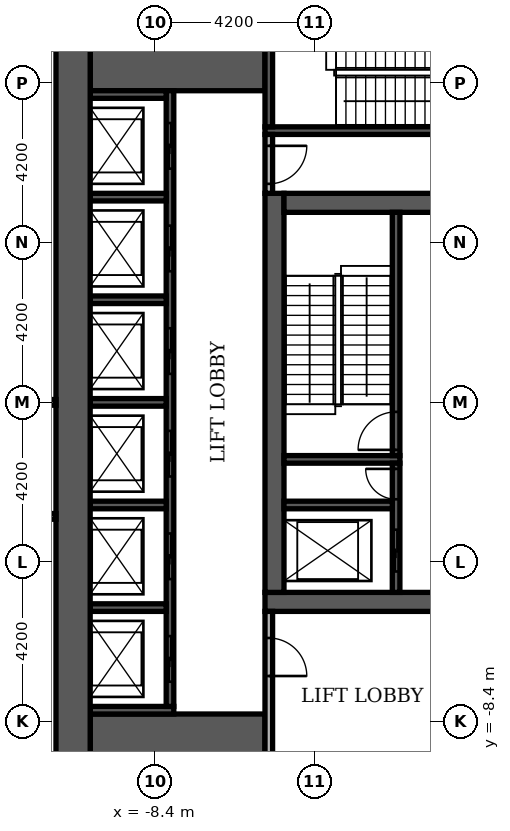
"""IFC4 building model, lengths in metres.
Left out: names, types, materials, properties, quantities, classifications, styles, units other than length and angle.
Written with IfcOpenShell. Run it as: python <this file> out.ifc"""

import sys

from ifc_helpers import new_model, si_unit, direction, frame, frame_2d, origin, place, context, subcontext, project, spatial, rectangle, extrude, element, fill, save


model = new_model("IFC4")
c1 = context("Model", 3, precision=1e-05, world=origin(), true_north=direction((0.0, 1.0)))
c2 = subcontext(c1, "Body", "Model", "MODEL_VIEW")
j1 = project(units=[si_unit("LENGTHUNIT", "METRE"), si_unit("PLANEANGLEUNIT", "RADIAN")], contexts=[c1])
p1 = place(None, origin())
s1 = spatial("IfcSite", under=j1, at=p1, CompositionType="ELEMENT")
p2 = place(p1, origin())
s2 = spatial("IfcBuilding", under=s1, at=p2, CompositionType="ELEMENT")
p3 = place(p2, frame((0.0, 0.0, 7.2)))
s3 = spatial("IfcBuildingStorey", under=s2, at=p3, CompositionType="ELEMENT", Elevation=7.2)
p4 = place(p3, frame((-5.5, -5.25, 0.0), z_axis=(0.0, 0.0, 1.0), x_axis=(1.0, 0.0, 0.0)))
e1 = element("IfcWall", 1, at=p4, inside=s3, PredefinedType="SHEAR", context=c2, shape_type="SweptSolid", body=[
    extrude(rectangle(XDim=11.0, YDim=0.5, at=frame_2d((5.5, 0.0))), origin(), (0.0, 0.0, 1.0), 4.38),
])
p5 = place(p4, frame((4.9, 0.0, 0.0)))
e2 = element("IfcOpeningElement", 2, at=p5, cuts=e1, PredefinedType="OPENING", context=c2, shape_type="SweptSolid", body=[
    extrude(rectangle(XDim=1.2, YDim=2.1, at=frame_2d((0.6, 1.05))), frame((0.0, 0.26, 0.0), z_axis=(0.0, -1.0, 0.0), x_axis=(1.0, 0.0, 0.0)), (0.0, 0.0, 1.0), 0.52),
])
p6 = place(p3, frame((-5.25, -5.0, 0.0), z_axis=(0.0, 0.0, 1.0), x_axis=(0.0, 1.0, 0.0)))
e3 = element("IfcWall", 3, at=p6, inside=s3, PredefinedType="SHEAR", context=c2, shape_type="SweptSolid", body=[
    extrude(rectangle(XDim=10.5, YDim=0.5, at=frame_2d((5.25, 0.0))), origin(), (0.0, 0.0, 1.0), 4.38),
])
p7 = place(p3, frame((-5.0, 5.25, 0.0), z_axis=(0.0, 0.0, 1.0), x_axis=(1.0, 0.0, 0.0)))
e4 = element("IfcWall", 4, at=p7, inside=s3, PredefinedType="SHEAR", context=c2, shape_type="SweptSolid", body=[
    extrude(rectangle(XDim=10.0, YDim=0.5, at=frame_2d((5.0, 0.0))), origin(), (0.0, 0.0, 1.0), 4.38),
])
p8 = place(p7, frame((4.4, 0.0, 0.0)))
e5 = element("IfcOpeningElement", 5, at=p8, cuts=e4, PredefinedType="OPENING", context=c2, shape_type="SweptSolid", body=[
    extrude(rectangle(XDim=1.2, YDim=2.1, at=frame_2d((0.6, 1.05))), frame((0.0, 0.26, 0.0), z_axis=(0.0, -1.0, 0.0), x_axis=(1.0, 0.0, 0.0)), (0.0, 0.0, 1.0), 0.52),
])
for number, where, z_axis, x_axis in (
    (6, (-10.1, -9.15, 0.0), (0.0, 0.0, 1.0), (1.0, 0.0, 0.0)),
    (7, (-10.1, 9.15, 0.0), (0.0, 0.0, 1.0), (1.0, 0.0, 0.0)),
):
    element("IfcWall", number, at=place(p3, frame(where, z_axis=z_axis, x_axis=x_axis)), inside=s3, PredefinedType="SHEAR", context=c2, shape_type="SweptSolid", body=[
        extrude(rectangle(XDim=4.6, YDim=1.9, at=frame_2d((2.3, 0.0))), origin(), (0.0, 0.0, 1.0), 4.38),
    ])
p9 = place(p3, frame((-5.0, -1.5, 0.0), z_axis=(0.0, 0.0, 1.0), x_axis=(1.0, 0.0, 0.0)))
e8 = element("IfcWall", 8, at=p9, inside=s3, PredefinedType="SHEAR", context=c2, shape_type="SweptSolid", body=[
    extrude(rectangle(XDim=3.05, YDim=0.2, at=frame_2d((1.525, 0.0))), origin(), (0.0, 0.0, 1.0), 4.38),
])
p10 = place(p3, frame((-2.05, -1.4, 0.0), z_axis=(0.0, 0.0, 1.0), x_axis=(0.0, 1.0, 0.0)))
e9 = element("IfcWall", 9, at=p10, inside=s3, PredefinedType="SHEAR", context=c2, shape_type="SweptSolid", body=[
    extrude(rectangle(XDim=6.4, YDim=0.2, at=frame_2d((3.2, 0.0))), origin(), (0.0, 0.0, 1.0), 4.38),
])
p11 = place(p10, frame((0.15, 0.0, 0.0)))
e10 = element("IfcOpeningElement", 10, at=p11, cuts=e9, PredefinedType="OPENING", context=c2, shape_type="SweptSolid", body=[
    extrude(rectangle(XDim=1.0, YDim=2.1, at=frame_2d((0.5, 1.05))), frame((0.0, 0.11, 0.0), z_axis=(0.0, -1.0, 0.0), x_axis=(1.0, 0.0, 0.0)), (0.0, 0.0, 1.0), 0.22),
])
p12 = place(p3, frame((-5.5, 7.15, 0.0), z_axis=(0.0, 0.0, 1.0), x_axis=(1.0, 0.0, 0.0)))
e11 = element("IfcWall", 11, at=p12, inside=s3, PredefinedType="SHEAR", context=c2, shape_type="SweptSolid", body=[
    extrude(rectangle(XDim=6.8, YDim=0.2, at=frame_2d((3.4, 0.0))), origin(), (0.0, 0.0, 1.0), 4.38),
])
p13 = place(p3, frame((-5.4, 7.25, 0.0), z_axis=(0.0, 0.0, 1.0), x_axis=(0.0, 1.0, 0.0)))
e12 = element("IfcWall", 12, at=p13, inside=s3, PredefinedType="SHEAR", context=c2, shape_type="SweptSolid", body=[
    extrude(rectangle(XDim=2.85, YDim=0.2, at=frame_2d((1.425, 0.0))), origin(), (0.0, 0.0, 1.0), 4.38),
])
p14 = place(p3, frame((-10.1, -8.1, 0.0), z_axis=(0.0, 0.0, 1.0), x_axis=(1.0, 0.0, 0.0)))
e13 = element("IfcWall", 13, at=p14, inside=s3, PredefinedType="SHEAR", context=c2, shape_type="SweptSolid", body=[
    extrude(rectangle(XDim=2.2, YDim=0.2, at=frame_2d((1.1, 0.0))), origin(), (0.0, 0.0, 1.0), 4.38),
])
p15 = place(p3, frame((-8.0, -8.0, 0.0), z_axis=(0.0, 0.0, 1.0), x_axis=(0.0, 1.0, 0.0)))
e14 = element("IfcWall", 14, at=p15, inside=s3, PredefinedType="SHEAR", context=c2, shape_type="SweptSolid", body=[
    extrude(rectangle(XDim=16.2, YDim=0.2, at=frame_2d((8.1, 0.0))), origin(), (0.0, 0.0, 1.0), 4.38),
])
p16 = place(p15, frame((0.65, 0.0, 0.0)))
e15 = element("IfcOpeningElement", 15, at=p16, cuts=e14, PredefinedType="OPENING", context=c2, shape_type="SweptSolid", body=[
    extrude(rectangle(XDim=1.2, YDim=2.1, at=frame_2d((0.6, 1.05))), frame((0.0, 0.11, 0.0), z_axis=(0.0, -1.0, 0.0), x_axis=(1.0, 0.0, 0.0)), (0.0, 0.0, 1.0), 0.22),
])
p17 = place(p15, frame((3.35, 0.0, 0.0)))
e16 = element("IfcOpeningElement", 16, at=p17, cuts=e14, PredefinedType="OPENING", context=c2, shape_type="SweptSolid", body=[
    extrude(rectangle(XDim=1.2, YDim=2.1, at=frame_2d((0.6, 1.05))), frame((0.0, 0.11, 0.0), z_axis=(0.0, -1.0, 0.0), x_axis=(1.0, 0.0, 0.0)), (0.0, 0.0, 1.0), 0.22),
])
p18 = place(p15, frame((6.05, 0.0, 0.0)))
e17 = element("IfcOpeningElement", 17, at=p18, cuts=e14, PredefinedType="OPENING", context=c2, shape_type="SweptSolid", body=[
    extrude(rectangle(XDim=1.2, YDim=2.1, at=frame_2d((0.6, 1.05))), frame((0.0, 0.11, 0.0), z_axis=(0.0, -1.0, 0.0), x_axis=(1.0, 0.0, 0.0)), (0.0, 0.0, 1.0), 0.22),
])
p19 = place(p15, frame((8.75, 0.0, 0.0)))
e18 = element("IfcOpeningElement", 18, at=p19, cuts=e14, PredefinedType="OPENING", context=c2, shape_type="SweptSolid", body=[
    extrude(rectangle(XDim=1.2, YDim=2.1, at=frame_2d((0.6, 1.05))), frame((0.0, 0.11, 0.0), z_axis=(0.0, -1.0, 0.0), x_axis=(1.0, 0.0, 0.0)), (0.0, 0.0, 1.0), 0.22),
])
p20 = place(p15, frame((11.45, 0.0, 0.0)))
e19 = element("IfcOpeningElement", 19, at=p20, cuts=e14, PredefinedType="OPENING", context=c2, shape_type="SweptSolid", body=[
    extrude(rectangle(XDim=1.2, YDim=2.1, at=frame_2d((0.6, 1.05))), frame((0.0, 0.11, 0.0), z_axis=(0.0, -1.0, 0.0), x_axis=(1.0, 0.0, 0.0)), (0.0, 0.0, 1.0), 0.22),
])
p21 = place(p15, frame((14.15, 0.0, 0.0)))
e20 = element("IfcOpeningElement", 20, at=p21, cuts=e14, PredefinedType="OPENING", context=c2, shape_type="SweptSolid", body=[
    extrude(rectangle(XDim=1.2, YDim=2.1, at=frame_2d((0.6, 1.05))), frame((0.0, 0.11, 0.0), z_axis=(0.0, -1.0, 0.0), x_axis=(1.0, 0.0, 0.0)), (0.0, 0.0, 1.0), 0.22),
])
p22 = place(p3, frame((-10.1, -5.4, 0.0), z_axis=(0.0, 0.0, 1.0), x_axis=(1.0, 0.0, 0.0)))
e21 = element("IfcWall", 21, at=p22, inside=s3, PredefinedType="SHEAR", context=c2, shape_type="SweptSolid", body=[
    extrude(rectangle(XDim=2.0, YDim=0.2, at=frame_2d((1.0, 0.0))), origin(), (0.0, 0.0, 1.0), 4.38),
])
p23 = place(p3, frame((-2.05, -5.0, 0.0), z_axis=(0.0, 0.0, 1.0), x_axis=(0.0, 1.0, 0.0)))
e22 = element("IfcWall", 22, at=p23, inside=s3, PredefinedType="SHEAR", context=c2, shape_type="SweptSolid", body=[
    extrude(rectangle(XDim=3.4, YDim=0.2, at=frame_2d((1.7, 0.0))), origin(), (0.0, 0.0, 1.0), 4.38),
])
p24 = place(p23, frame((0.55, 0.0, 0.0)))
e23 = element("IfcOpeningElement", 23, at=p24, cuts=e22, PredefinedType="OPENING", context=c2, shape_type="SweptSolid", body=[
    extrude(rectangle(XDim=1.1, YDim=2.1, at=frame_2d((0.55, 1.05))), frame((0.0, 0.11, 0.0), z_axis=(0.0, -1.0, 0.0), x_axis=(1.0, 0.0, 0.0)), (0.0, 0.0, 1.0), 0.22),
])
p25 = place(p23, frame((2.45, 0.0, 0.0)))
e24 = element("IfcOpeningElement", 24, at=p25, cuts=e22, PredefinedType="OPENING", context=c2, shape_type="SweptSolid", body=[
    extrude(rectangle(XDim=0.8, YDim=2.1, at=frame_2d((0.4, 1.05))), frame((0.0, 0.11, 0.0), z_axis=(0.0, -1.0, 0.0), x_axis=(1.0, 0.0, 0.0)), (0.0, 0.0, 1.0), 0.22),
])
p26 = place(p3, frame((-10.1, -2.7, 0.0), z_axis=(0.0, 0.0, 1.0), x_axis=(1.0, 0.0, 0.0)))
e25 = element("IfcWall", 25, at=p26, inside=s3, PredefinedType="SHEAR", context=c2, shape_type="SweptSolid", body=[
    extrude(rectangle(XDim=2.0, YDim=0.2, at=frame_2d((1.0, 0.0))), origin(), (0.0, 0.0, 1.0), 4.38),
])
p27 = place(p3, frame((-5.0, -2.7, 0.0), z_axis=(0.0, 0.0, 1.0), x_axis=(1.0, 0.0, 0.0)))
e26 = element("IfcWall", 26, at=p27, inside=s3, PredefinedType="SHEAR", context=c2, shape_type="SweptSolid", body=[
    extrude(rectangle(XDim=2.85, YDim=0.2, at=frame_2d((1.425, 0.0))), origin(), (0.0, 0.0, 1.0), 4.38),
])
for number, where, z_axis, x_axis in (
    (27, (-10.1, 0.0, 0.0), (0.0, 0.0, 1.0), (1.0, 0.0, 0.0)),
    (28, (-10.1, 2.7, 0.0), (0.0, 0.0, 1.0), (1.0, 0.0, 0.0)),
    (29, (-10.1, 5.4, 0.0), (0.0, 0.0, 1.0), (1.0, 0.0, 0.0)),
    (30, (-10.1, 8.1, 0.0), (0.0, 0.0, 1.0), (1.0, 0.0, 0.0)),
):
    element("IfcWall", number, at=place(p3, frame(where, z_axis=z_axis, x_axis=x_axis)), inside=s3, PredefinedType="SHEAR", context=c2, shape_type="SweptSolid", body=[
        extrude(rectangle(XDim=2.0, YDim=0.2, at=frame_2d((1.0, 0.0))), origin(), (0.0, 0.0, 1.0), 4.38),
    ])
p28 = place(p3, frame((-10.55, -10.1, 0.0), z_axis=(0.0, 0.0, 1.0), x_axis=(0.0, 1.0, 0.0)))
e31 = element("IfcWall", 31, at=p28, inside=s3, PredefinedType="SHEAR", context=c2, shape_type="SweptSolid", body=[
    extrude(rectangle(XDim=20.2, YDim=0.9, at=frame_2d((10.1, 0.0))), origin(), (0.0, 0.0, 1.0), 4.38),
])
p29 = place(p3, frame((-5.4, -10.1, 0.0), z_axis=(0.0, 0.0, 1.0), x_axis=(0.0, 1.0, 0.0)))
e32 = element("IfcWall", 32, at=p29, inside=s3, PredefinedType="PARTITIONING", context=c2, shape_type="SweptSolid", body=[
    extrude(rectangle(XDim=4.6, YDim=0.2, at=frame_2d((2.3, 0.0))), origin(), (0.0, 0.0, 1.0), 4.38),
])
p30 = place(p29, frame((2.9, 0.0, 0.0)))
e33 = element("IfcOpeningElement", 33, at=p30, cuts=e32, PredefinedType="OPENING", context=c2, shape_type="SweptSolid", body=[
    extrude(rectangle(XDim=1.0, YDim=2.1, at=frame_2d((0.5, 1.05))), frame((0.0, 0.11, 0.0), z_axis=(0.0, -1.0, 0.0), x_axis=(1.0, 0.0, 0.0)), (0.0, 0.0, 1.0), 0.22),
])
p31 = place(p3, frame((-5.4, 5.5, 0.0), z_axis=(0.0, 0.0, 1.0), x_axis=(0.0, 1.0, 0.0)))
e34 = element("IfcWall", 34, at=p31, inside=s3, PredefinedType="PARTITIONING", context=c2, shape_type="SweptSolid", body=[
    extrude(rectangle(XDim=1.55, YDim=0.2, at=frame_2d((0.775, 0.0))), origin(), (0.0, 0.0, 1.0), 4.38),
])
p32 = place(p31, frame((0.25, 0.0, 0.0)))
e35 = element("IfcOpeningElement", 35, at=p32, cuts=e34, PredefinedType="OPENING", context=c2, shape_type="SweptSolid", body=[
    extrude(rectangle(XDim=1.0, YDim=2.1, at=frame_2d((0.5, 1.05))), frame((0.0, 0.11, 0.0), z_axis=(0.0, -1.0, 0.0), x_axis=(1.0, 0.0, 0.0)), (0.0, 0.0, 1.0), 0.22),
])
p33 = place(p3, frame((-25.1, -3.0, 0.0), z_axis=(0.0, 0.0, 1.0), x_axis=(1.0, 0.0, 0.0)))
e36 = element("IfcWall", 36, at=p33, inside=s3, PredefinedType="PARTITIONING", context=c2, shape_type="SweptSolid", body=[
    extrude(rectangle(XDim=14.1, YDim=0.15, at=frame_2d((7.05, 0.0))), origin(), (0.0, 0.0, 1.0), 4.38),
])
p34 = place(p33, frame((6.5, 0.0, 0.0)))
e37 = element("IfcOpeningElement", 37, at=p34, cuts=e36, PredefinedType="OPENING", context=c2, shape_type="SweptSolid", body=[
    extrude(rectangle(XDim=1.0, YDim=2.1, at=frame_2d((0.5, 1.05))), frame((0.0, 0.085, 0.0), z_axis=(0.0, -1.0, 0.0), x_axis=(1.0, 0.0, 0.0)), (0.0, 0.0, 1.0), 0.17),
])
p35 = place(p3, frame((-24.6, 0.0, 0.0), z_axis=(0.0, 0.0, 1.0), x_axis=(1.0, 0.0, 0.0)))
e38 = element("IfcWall", 38, at=p35, inside=s3, PredefinedType="PARTITIONING", context=c2, shape_type="SweptSolid", body=[
    extrude(rectangle(XDim=13.6, YDim=0.15, at=frame_2d((6.8, 0.0))), origin(), (0.0, 0.0, 1.0), 4.38),
])
p36 = place(p16, origin())
e39 = element("IfcDoor", 39, at=p36, inside=s3, OperationType="SLIDING_TO_LEFT", PredefinedType="DOOR", context=c2, shape_type="SweptSolid", body=[
    extrude(rectangle(XDim=1.2, YDim=2.1, at=frame_2d((0.6, 1.05))), frame((0.0, 0.025, 0.0), z_axis=(0.0, -1.0, 0.0), x_axis=(1.0, 0.0, 0.0)), (0.0, 0.0, 1.0), 0.05),
])
fill(e15, e39)
p37 = place(p17, origin())
e40 = element("IfcDoor", 40, at=p37, inside=s3, OperationType="SLIDING_TO_LEFT", PredefinedType="DOOR", context=c2, shape_type="SweptSolid", body=[
    extrude(rectangle(XDim=1.2, YDim=2.1, at=frame_2d((0.6, 1.05))), frame((0.0, 0.025, 0.0), z_axis=(0.0, -1.0, 0.0), x_axis=(1.0, 0.0, 0.0)), (0.0, 0.0, 1.0), 0.05),
])
fill(e16, e40)
p38 = place(p18, origin())
e41 = element("IfcDoor", 41, at=p38, inside=s3, OperationType="SLIDING_TO_LEFT", PredefinedType="DOOR", context=c2, shape_type="SweptSolid", body=[
    extrude(rectangle(XDim=1.2, YDim=2.1, at=frame_2d((0.6, 1.05))), frame((0.0, 0.025, 0.0), z_axis=(0.0, -1.0, 0.0), x_axis=(1.0, 0.0, 0.0)), (0.0, 0.0, 1.0), 0.05),
])
fill(e17, e41)
p39 = place(p19, origin())
e42 = element("IfcDoor", 42, at=p39, inside=s3, OperationType="SLIDING_TO_LEFT", PredefinedType="DOOR", context=c2, shape_type="SweptSolid", body=[
    extrude(rectangle(XDim=1.2, YDim=2.1, at=frame_2d((0.6, 1.05))), frame((0.0, 0.025, 0.0), z_axis=(0.0, -1.0, 0.0), x_axis=(1.0, 0.0, 0.0)), (0.0, 0.0, 1.0), 0.05),
])
fill(e18, e42)
p40 = place(p20, origin())
e43 = element("IfcDoor", 43, at=p40, inside=s3, OperationType="SLIDING_TO_LEFT", PredefinedType="DOOR", context=c2, shape_type="SweptSolid", body=[
    extrude(rectangle(XDim=1.2, YDim=2.1, at=frame_2d((0.6, 1.05))), frame((0.0, 0.025, 0.0), z_axis=(0.0, -1.0, 0.0), x_axis=(1.0, 0.0, 0.0)), (0.0, 0.0, 1.0), 0.05),
])
fill(e19, e43)
p41 = place(p21, origin())
e44 = element("IfcDoor", 44, at=p41, inside=s3, OperationType="SLIDING_TO_LEFT", PredefinedType="DOOR", context=c2, shape_type="SweptSolid", body=[
    extrude(rectangle(XDim=1.2, YDim=2.1, at=frame_2d((0.6, 1.05))), frame((0.0, 0.025, 0.0), z_axis=(0.0, -1.0, 0.0), x_axis=(1.0, 0.0, 0.0)), (0.0, 0.0, 1.0), 0.05),
])
fill(e20, e44)
p42 = place(p24, origin())
e45 = element("IfcDoor", 45, at=p42, inside=s3, OperationType="SLIDING_TO_LEFT", PredefinedType="DOOR", context=c2, shape_type="SweptSolid", body=[
    extrude(rectangle(XDim=1.1, YDim=2.1, at=frame_2d((0.55, 1.05))), frame((0.0, 0.025, 0.0), z_axis=(0.0, -1.0, 0.0), x_axis=(1.0, 0.0, 0.0)), (0.0, 0.0, 1.0), 0.05),
])
fill(e23, e45)
p43 = place(p11, origin())
e46 = element("IfcDoor", 46, at=p43, inside=s3, OperationType="SINGLE_SWING_LEFT", PredefinedType="DOOR", context=c2, shape_type="SweptSolid", body=[
    extrude(rectangle(XDim=1.0, YDim=2.1, at=frame_2d((0.5, 1.05))), frame((0.0, 0.025, 0.0), z_axis=(0.0, -1.0, 0.0), x_axis=(1.0, 0.0, 0.0)), (0.0, 0.0, 1.0), 0.05),
])
fill(e10, e46)
p44 = place(p25, origin())
e47 = element("IfcDoor", 47, at=p44, inside=s3, OperationType="SINGLE_SWING_RIGHT", PredefinedType="DOOR", context=c2, shape_type="SweptSolid", body=[
    extrude(rectangle(XDim=0.8, YDim=2.1, at=frame_2d((0.4, 1.05))), frame((0.0, 0.025, 0.0), z_axis=(0.0, -1.0, 0.0), x_axis=(1.0, 0.0, 0.0)), (0.0, 0.0, 1.0), 0.05),
])
fill(e24, e47)
p45 = place(p32, frame((1.0, 0.0, 0.0), z_axis=(0.0, 0.0, 1.0), x_axis=(-1.0, 0.0, 0.0)))
e48 = element("IfcDoor", 48, at=p45, inside=s3, OperationType="SINGLE_SWING_RIGHT", PredefinedType="DOOR", context=c2, shape_type="SweptSolid", body=[
    extrude(rectangle(XDim=1.0, YDim=2.1, at=frame_2d((0.5, 1.05))), frame((0.0, 0.025, 0.0), z_axis=(0.0, -1.0, 0.0), x_axis=(1.0, 0.0, 0.0)), (0.0, 0.0, 1.0), 0.05),
])
fill(e35, e48)
p46 = place(p30, frame((1.0, 0.0, 0.0), z_axis=(0.0, 0.0, 1.0), x_axis=(-1.0, 0.0, 0.0)))
e49 = element("IfcDoor", 49, at=p46, inside=s3, OperationType="SINGLE_SWING_LEFT", PredefinedType="DOOR", context=c2, shape_type="SweptSolid", body=[
    extrude(rectangle(XDim=1.0, YDim=2.1, at=frame_2d((0.5, 1.05))), frame((0.0, 0.025, 0.0), z_axis=(0.0, -1.0, 0.0), x_axis=(1.0, 0.0, 0.0)), (0.0, 0.0, 1.0), 0.05),
])
fill(e33, e49)
save(model, sys.argv[1])
